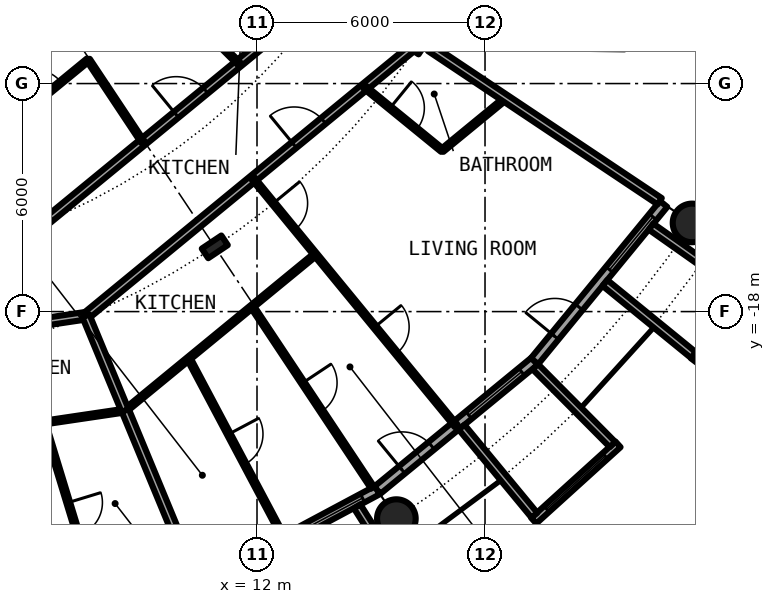
"""IFC4 building model, lengths in metres.
Left out: names, types, materials, properties, quantities, classifications, styles, units other than length and angle.
Written with IfcOpenShell. Run it as: python <this file> out.ifc"""

import sys

from ifc_helpers import new_model, si_unit, direction, frame, frame_2d, origin, origin_2d, place, context, subcontext, project, spatial, rectangle, circle, hollow_circle, i_section, extrude, element, fill, save


model = new_model("IFC4")
c1 = context("Model", 3, precision=1e-05, world=origin(), true_north=direction((0.0, 1.0)))
c2 = subcontext(c1, "Body", "Model", "MODEL_VIEW")
j1 = project(units=[si_unit("LENGTHUNIT", "METRE"), si_unit("PLANEANGLEUNIT", "RADIAN")], contexts=[c1])
p1 = place(None, origin())
s1 = spatial("IfcSite", under=j1, at=p1, CompositionType="ELEMENT")
p2 = place(p1, origin())
s2 = spatial("IfcBuilding", under=s1, at=p2, CompositionType="ELEMENT")
p3 = place(p2, frame((0.0, 0.0, 35.0)))
s3 = spatial("IfcBuildingStorey", under=s2, at=p3, CompositionType="ELEMENT", Elevation=35.0)
for number, where, z_axis, x_axis in (
    (1, (15.667, -23.448, 0.0), (0.0, 0.0, 1.0), (1.0, 0.0, 0.0)),
    (2, (23.448, -15.667, 0.0), (0.0, 0.0, 1.0), (1.0, 0.0, 0.0)),
):
    element("IfcColumn", number, at=place(p3, frame(where, z_axis=z_axis, x_axis=x_axis)), inside=s3, PredefinedType="COLUMN", context=c2, shape_type="SweptSolid", body=[
        extrude(hollow_circle(Radius=0.508, WallThickness=0.05, at=origin_2d()), origin(), (0.0, 0.0, 1.0), 3.05),
    ])
for number, where, z_axis, x_axis in (
    (3, (10.889, -16.297, 0.0), (0.0, 0.0, 1.0), (0.556, -0.831, 0.0)),
    (4, (16.297, -10.889, 0.0), (0.0, 0.0, 1.0), (0.831, -0.556, 0.0)),
):
    element("IfcColumn", number, at=place(p3, frame(where, z_axis=z_axis, x_axis=x_axis)), inside=s3, PredefinedType="COLUMN", context=c2, shape_type="SweptSolid", body=[
        extrude(i_section(OverallWidth=0.305, OverallDepth=0.62, WebThickness=0.021, FlangeThickness=0.04, FilletRadius=0.027, at=origin_2d()), origin(), (0.0, 0.0, 1.0), 3.05),
    ])
p4 = place(p3, frame((10.447, -25.222, 0.0), z_axis=(0.0, 0.0, 1.0), x_axis=(0.881915646801, 0.471407246368, 0.0)))
e5 = element("IfcWall", 5, at=p4, inside=s3, PredefinedType="SOLIDWALL", context=c2, shape_type="SweptSolid", body=[
    extrude(rectangle(XDim=5.352, YDim=0.25, at=frame_2d((2.676, 0.0))), origin(), (0.0, 0.0, 1.0), 2.7),
])
p5 = place(p4, frame((0.841, 0.0, 0.0)))
e6 = element("IfcOpeningElement", 6, at=p5, cuts=e5, PredefinedType="OPENING", context=c2, shape_type="SweptSolid", body=[
    extrude(rectangle(XDim=1.0, YDim=2.2, at=frame_2d((0.5, 1.1))), frame((0.0, 0.135, 0.0), z_axis=(0.0, -1.0, 0.0), x_axis=(1.0, 0.0, 0.0)), (0.0, 0.0, 1.0), 0.27),
])
p6 = place(p4, frame((3.111, 0.0, 0.3)))
e7 = element("IfcOpeningElement", 7, at=p6, cuts=e5, PredefinedType="OPENING", context=c2, shape_type="SweptSolid", body=[
    extrude(rectangle(XDim=1.8, YDim=2.1, at=frame_2d((0.9, 1.05))), frame((0.0, 0.135, 0.0), z_axis=(0.0, -1.0, 0.0), x_axis=(1.0, 0.0, 0.0)), (0.0, 0.0, 1.0), 0.27),
])
p7 = place(p3, frame((14.635, -23.126, -0.03), z_axis=(0.0, 0.0, 1.0), x_axis=(0.534437802731, -0.845207805816, 0.0)))
e8 = element("IfcWall", 8, at=p7, inside=s3, PredefinedType="SOLIDWALL", context=c2, shape_type="SweptSolid", body=[
    extrude(rectangle(XDim=2.932, YDim=0.2, at=frame_2d((1.466, 0.0))), origin(), (0.0, 0.0, 1.0), 2.73),
])
p8 = place(p3, frame((15.167, -22.699, 0.0), z_axis=(0.0, 0.0, 1.0), x_axis=(0.773019449054, 0.634382322723, 0.0)))
e9 = element("IfcWall", 9, at=p8, inside=s3, PredefinedType="SOLIDWALL", context=c2, shape_type="SweptSolid", body=[
    extrude(rectangle(XDim=5.352, YDim=0.25, at=frame_2d((2.676, 0.0))), origin(), (0.0, 0.0, 1.0), 2.7),
])
p9 = place(p8, frame((0.841, 0.0, 0.0)))
e10 = element("IfcOpeningElement", 10, at=p9, cuts=e9, PredefinedType="OPENING", context=c2, shape_type="SweptSolid", body=[
    extrude(rectangle(XDim=1.0, YDim=2.2, at=frame_2d((0.5, 1.1))), frame((0.0, 0.135, 0.0), z_axis=(0.0, -1.0, 0.0), x_axis=(1.0, 0.0, 0.0)), (0.0, 0.0, 1.0), 0.27),
])
p10 = place(p8, frame((3.111, 0.0, 0.3)))
e11 = element("IfcOpeningElement", 11, at=p10, cuts=e9, PredefinedType="OPENING", context=c2, shape_type="SweptSolid", body=[
    extrude(rectangle(XDim=1.8, YDim=2.1, at=frame_2d((0.9, 1.05))), frame((0.0, 0.135, 0.0), z_axis=(0.0, -1.0, 0.0), x_axis=(1.0, 0.0, 0.0)), (0.0, 0.0, 1.0), 0.27),
])
p11 = place(p3, frame((19.282, -23.503, -0.03), z_axis=(0.0, 0.0, 1.0), x_axis=(0.740998365753, 0.671506829416, 0.0)))
e12 = element("IfcWall", 12, at=p11, inside=s3, PredefinedType="SOLIDWALL", context=c2, shape_type="SweptSolid", body=[
    extrude(rectangle(XDim=2.993, YDim=0.2, at=frame_2d((1.497, 0.0))), origin(), (0.0, 0.0, 1.0), 2.73),
])
p12 = place(p11, frame((0.457, 0.0, 0.33)))
e13 = element("IfcOpeningElement", 13, at=p12, cuts=e12, PredefinedType="OPENING", context=c2, shape_type="SweptSolid", body=[
    extrude(circle(Radius=1.04, at=frame_2d((1.04, 1.04))), frame((0.0, 0.11, 0.0), z_axis=(0.0, -1.0, 0.0), x_axis=(1.0, 0.0, 0.0)), (0.0, 0.0, 1.0), 0.22),
])
p13 = place(p3, frame((17.384, -21.041, -0.03), z_axis=(0.0, 0.0, 1.0), x_axis=(0.63709551667, -0.770784861449, 0.0)))
e14 = element("IfcWall", 14, at=p13, inside=s3, PredefinedType="SOLIDWALL", context=c2, shape_type="SweptSolid", body=[
    extrude(rectangle(XDim=3.006, YDim=0.2, at=frame_2d((1.503, 0.0))), origin(), (0.0, 0.0, 1.0), 2.73),
])
p14 = place(p3, frame((19.323, -19.45, -0.03), z_axis=(0.0, 0.0, 1.0), x_axis=(0.704476739375, -0.709727076896, 0.0)))
e15 = element("IfcWall", 15, at=p14, inside=s3, PredefinedType="SOLIDWALL", context=c2, shape_type="SweptSolid", body=[
    extrude(rectangle(XDim=2.883, YDim=0.2, at=frame_2d((1.441, 0.0))), origin(), (0.0, 0.0, 1.0), 2.73),
])
p15 = place(p3, frame((19.304, -19.304, 0.0), z_axis=(0.0, 0.0, 1.0), x_axis=(0.634382322723, 0.773019449054, 0.0)))
e16 = element("IfcWall", 16, at=p15, inside=s3, PredefinedType="SOLIDWALL", context=c2, shape_type="SweptSolid", body=[
    extrude(rectangle(XDim=5.352, YDim=0.25, at=frame_2d((2.676, 0.0))), origin(), (0.0, 0.0, 1.0), 2.7),
])
p16 = place(p15, frame((0.841, 0.0, 0.0)))
e17 = element("IfcOpeningElement", 17, at=p16, cuts=e16, PredefinedType="OPENING", context=c2, shape_type="SweptSolid", body=[
    extrude(rectangle(XDim=1.0, YDim=2.2, at=frame_2d((0.5, 1.1))), frame((0.0, 0.135, 0.0), z_axis=(0.0, -1.0, 0.0), x_axis=(1.0, 0.0, 0.0)), (0.0, 0.0, 1.0), 0.27),
])
p17 = place(p15, frame((3.111, 0.0, 0.3)))
e18 = element("IfcOpeningElement", 18, at=p17, cuts=e16, PredefinedType="OPENING", context=c2, shape_type="SweptSolid", body=[
    extrude(rectangle(XDim=1.8, YDim=2.1, at=frame_2d((0.9, 1.05))), frame((0.0, 0.135, 0.0), z_axis=(0.0, -1.0, 0.0), x_axis=(1.0, 0.0, 0.0)), (0.0, 0.0, 1.0), 0.27),
])
p18 = place(p3, frame((23.497, -19.289, -0.03), z_axis=(0.0, 0.0, 1.0), x_axis=(0.60418752353, 0.796842165306, 0.0)))
e19 = element("IfcWall", 19, at=p18, inside=s3, PredefinedType="SOLIDWALL", context=c2, shape_type="SweptSolid", body=[
    extrude(rectangle(XDim=2.337, YDim=0.2, at=frame_2d((1.168, 0.0))), origin(), (0.0, 0.0, 1.0), 2.73),
])
p19 = place(p18, frame((0.128, 0.0, 0.33)))
e20 = element("IfcOpeningElement", 20, at=p19, cuts=e19, PredefinedType="OPENING", context=c2, shape_type="SweptSolid", body=[
    extrude(circle(Radius=1.04, at=frame_2d((1.04, 1.04))), frame((0.0, 0.11, 0.0), z_axis=(0.0, -1.0, 0.0), x_axis=(1.0, 0.0, 0.0)), (0.0, 0.0, 1.0), 0.22),
])
p20 = place(p3, frame((21.155, -17.246, -0.03), z_axis=(0.0, 0.0, 1.0), x_axis=(0.775179004516, -0.631741648902, 0.0)))
e21 = element("IfcWall", 21, at=p20, inside=s3, PredefinedType="SOLIDWALL", context=c2, shape_type="SweptSolid", body=[
    extrude(rectangle(XDim=3.006, YDim=0.2, at=frame_2d((1.503, 0.0))), origin(), (0.0, 0.0, 1.0), 2.73),
])
p21 = place(p3, frame((22.37, -15.765, -0.03), z_axis=(0.0, 0.0, 1.0), x_axis=(0.817256123454, -0.576274612209, 0.0)))
e22 = element("IfcWall", 22, at=p21, inside=s3, PredefinedType="SOLIDWALL", context=c2, shape_type="SweptSolid", body=[
    extrude(rectangle(XDim=2.933, YDim=0.2, at=frame_2d((1.466, 0.0))), origin(), (0.0, 0.0, 1.0), 2.73),
])
p22 = place(p3, frame((4.246, -21.239, 0.0), z_axis=(0.0, 0.0, 1.0), x_axis=(0.989178348771, 0.146718077695, 0.0)))
e23 = element("IfcWall", 23, at=p22, inside=s3, PredefinedType="PARTITIONING", context=c2, shape_type="SweptSolid", body=[
    extrude(rectangle(XDim=4.335, YDim=0.1, at=frame_2d((2.167, 0.0))), origin(), (0.0, 0.0, 1.0), 2.7),
])
p23 = place(p3, frame((8.534, -20.603, 0.0), z_axis=(0.0, 0.0, 1.0), x_axis=(0.773000340237, 0.634405606843, 0.0)))
e24 = element("IfcWall", 24, at=p23, inside=s3, PredefinedType="PARTITIONING", context=c2, shape_type="SweptSolid", body=[
    extrude(rectangle(XDim=6.474, YDim=0.1, at=frame_2d((3.237, 0.0))), origin(), (0.0, 0.0, 1.0), 2.7),
])
p24 = place(p3, frame((16.874, -13.758, 0.0), z_axis=(0.0, 0.0, 1.0), x_axis=(0.772948171844, 0.634469166818, 0.0)))
e25 = element("IfcWall", 25, at=p24, inside=s3, PredefinedType="PARTITIONING", context=c2, shape_type="SweptSolid", body=[
    extrude(rectangle(XDim=2.158, YDim=0.1, at=frame_2d((1.079, 0.0))), origin(), (0.0, 0.0, 1.0), 2.7),
])
p25 = place(p3, frame((-1.927, -19.506, 0.0), z_axis=(0.0, 0.0, 1.0), x_axis=(0.989181308547, 0.146698121399, 0.0)))
e26 = element("IfcWall", 26, at=p25, inside=s3, PredefinedType="PARTITIONING", context=c2, shape_type="SweptSolid", body=[
    extrude(rectangle(XDim=9.531, YDim=0.2, at=frame_2d((4.766, 0.0))), origin(), (0.0, 0.0, 1.0), 2.38),
])
p26 = place(p25, frame((3.316, 0.0, 0.0)))
e27 = element("IfcOpeningElement", 27, at=p26, cuts=e26, PredefinedType="OPENING", context=c2, shape_type="SweptSolid", body=[
    extrude(rectangle(XDim=1.0, YDim=2.3, at=frame_2d((0.5, 1.15))), frame((0.0, 0.11, 0.0), z_axis=(0.0, -1.0, 0.0), x_axis=(1.0, 0.0, 0.0)), (0.0, 0.0, 1.0), 0.22),
])
p27 = place(p3, frame((7.512, -18.105, 0.0), z_axis=(0.0, 0.0, 1.0), x_axis=(0.772704887747, 0.634765434198, 0.0)))
e28 = element("IfcWall", 28, at=p27, inside=s3, PredefinedType="PARTITIONING", context=c2, shape_type="SweptSolid", body=[
    extrude(rectangle(XDim=11.209, YDim=0.2, at=frame_2d((5.604, 0.0))), origin(), (0.0, 0.0, 1.0), 2.38),
])
p28 = place(p27, frame((7.072, 0.0, 0.0)))
e29 = element("IfcOpeningElement", 29, at=p28, cuts=e28, PredefinedType="OPENING", context=c2, shape_type="SweptSolid", body=[
    extrude(rectangle(XDim=1.0, YDim=2.3, at=frame_2d((0.5, 1.15))), frame((0.0, 0.11, 0.0), z_axis=(0.0, -1.0, 0.0), x_axis=(1.0, 0.0, 0.0)), (0.0, 0.0, 1.0), 0.22),
])
p29 = place(p3, frame((6.467, -15.614, 0.0), z_axis=(0.0, 0.0, 1.0), x_axis=(0.773084654695, 0.634302858794, 0.0)))
e30 = element("IfcWall", 30, at=p29, inside=s3, PredefinedType="PARTITIONING", context=c2, shape_type="SweptSolid", body=[
    extrude(rectangle(XDim=9.793, YDim=0.2, at=frame_2d((4.896, 0.0))), origin(), (0.0, 0.0, 1.0), 2.7),
])
p30 = place(p29, frame((4.407, 0.0, 0.0)))
e31 = element("IfcOpeningElement", 31, at=p30, cuts=e30, PredefinedType="OPENING", context=c2, shape_type="SweptSolid", body=[
    extrude(rectangle(XDim=1.0, YDim=2.3, at=frame_2d((0.5, 1.15))), frame((0.0, 0.11, 0.0), z_axis=(0.0, -1.0, 0.0), x_axis=(1.0, 0.0, 0.0)), (0.0, 0.0, 1.0), 0.22),
])
p31 = place(p3, frame((5.434, -13.119, 0.0), z_axis=(0.0, 0.0, 1.0), x_axis=(0.773049907698, 0.634345205868, 0.0)))
e32 = element("IfcWall", 32, at=p31, inside=s3, PredefinedType="PARTITIONING", context=c2, shape_type="SweptSolid", body=[
    extrude(rectangle(XDim=2.748, YDim=0.1, at=frame_2d((1.374, 0.0))), origin(), (0.0, 0.0, 1.0), 2.7),
])
p32 = place(p31, frame((0.924, 0.0, 0.0)))
e33 = element("IfcOpeningElement", 33, at=p32, cuts=e32, PredefinedType="OPENING", context=c2, shape_type="SweptSolid", body=[
    extrude(rectangle(XDim=0.9, YDim=2.3, at=frame_2d((0.45, 1.15))), frame((0.0, 0.06, 0.0), z_axis=(0.0, -1.0, 0.0), x_axis=(1.0, 0.0, 0.0)), (0.0, 0.0, 1.0), 0.12),
])
p33 = place(p3, frame((6.39, -20.921, 0.0), z_axis=(0.0, 0.0, 1.0), x_axis=(0.292081613207, -0.956393397732, 0.0)))
e34 = element("IfcWall", 34, at=p33, inside=s3, PredefinedType="PARTITIONING", context=c2, shape_type="SweptSolid", body=[
    extrude(rectangle(XDim=5.3, YDim=0.1, at=frame_2d((2.65, 0.0))), origin(), (0.0, 0.0, 1.0), 2.7),
])
p34 = place(p33, frame((2.2, 0.0, 0.0)))
e35 = element("IfcOpeningElement", 35, at=p34, cuts=e34, PredefinedType="OPENING", context=c2, shape_type="SweptSolid", body=[
    extrude(rectangle(XDim=0.9, YDim=2.3, at=frame_2d((0.45, 1.15))), frame((0.0, 0.06, 0.0), z_axis=(0.0, -1.0, 0.0), x_axis=(1.0, 0.0, 0.0)), (0.0, 0.0, 1.0), 0.12),
])
p35 = place(p3, frame((7.496, -18.11, 0.0), z_axis=(0.0, 0.0, 1.0), x_axis=(0.382540781694, -0.923938607452, 0.0)))
e36 = element("IfcWall", 36, at=p35, inside=s3, PredefinedType="PARTITIONING", context=c2, shape_type="SweptSolid", body=[
    extrude(rectangle(XDim=2.7, YDim=0.2, at=frame_2d((1.35, 0.0))), origin(), (0.0, 0.0, 1.0), 2.7),
])
p36 = place(p3, frame((7.558, -11.376, 0.0), z_axis=(0.0, 0.0, 1.0), x_axis=(0.553615197403, -0.83277260594, 0.0)))
e37 = element("IfcWall", 37, at=p36, inside=s3, PredefinedType="PARTITIONING", context=c2, shape_type="SweptSolid", body=[
    extrude(rectangle(XDim=2.597, YDim=0.1, at=frame_2d((1.299, 0.0))), origin(), (0.0, 0.0, 1.0), 2.7),
])
p37 = place(p3, frame((8.534, -20.603, 0.0), z_axis=(0.0, 0.0, 1.0), x_axis=(0.382651153718, -0.923892902104, 0.0)))
e38 = element("IfcWall", 38, at=p37, inside=s3, PredefinedType="PARTITIONING", context=c2, shape_type="SweptSolid", body=[
    extrude(rectangle(XDim=4.874, YDim=0.2, at=frame_2d((2.437, 0.0))), origin(), (0.0, 0.0, 1.0), 2.7),
])
p38 = place(p3, frame((9.679, -9.636, 0.0), z_axis=(0.0, 0.0, 1.0), x_axis=(0.708843617398, -0.705365668341, 0.0)))
e39 = element("IfcWall", 39, at=p38, inside=s3, PredefinedType="PARTITIONING", context=c2, shape_type="SweptSolid", body=[
    extrude(rectangle(XDim=2.597, YDim=0.1, at=frame_2d((1.299, 0.0))), origin(), (0.0, 0.0, 1.0), 2.7),
])
p39 = place(p38, frame((0.849, 0.0, 0.0)))
e40 = element("IfcOpeningElement", 40, at=p39, cuts=e39, PredefinedType="OPENING", context=c2, shape_type="SweptSolid", body=[
    extrude(rectangle(XDim=0.9, YDim=2.3, at=frame_2d((0.45, 1.15))), frame((0.0, 0.06, 0.0), z_axis=(0.0, -1.0, 0.0), x_axis=(1.0, 0.0, 0.0)), (0.0, 0.0, 1.0), 0.12),
])
p40 = place(p3, frame((10.202, -19.234, 0.0), z_axis=(0.0, 0.0, 1.0), x_axis=(0.468610030042, -0.883405139075, 0.0)))
e41 = element("IfcWall", 41, at=p40, inside=s3, PredefinedType="PARTITIONING", context=c2, shape_type="SweptSolid", body=[
    extrude(rectangle(XDim=5.403, YDim=0.1, at=frame_2d((2.702, 0.0))), origin(), (0.0, 0.0, 1.0), 2.7),
])
p41 = place(p40, frame((2.252, 0.0, 0.0)))
e42 = element("IfcOpeningElement", 42, at=p41, cuts=e41, PredefinedType="OPENING", context=c2, shape_type="SweptSolid", body=[
    extrude(rectangle(XDim=0.9, YDim=2.3, at=frame_2d((0.45, 1.15))), frame((0.0, 0.06, 0.0), z_axis=(0.0, -1.0, 0.0), x_axis=(1.0, 0.0, 0.0)), (0.0, 0.0, 1.0), 0.12),
])
p42 = place(p3, frame((11.871, -17.864, 0.0), z_axis=(0.0, 0.0, 1.0), x_axis=(0.553637025191, -0.83275809473, 0.0)))
e43 = element("IfcWall", 43, at=p42, inside=s3, PredefinedType="PARTITIONING", context=c2, shape_type="SweptSolid", body=[
    extrude(rectangle(XDim=5.726, YDim=0.1, at=frame_2d((2.863, 0.0))), origin(), (0.0, 0.0, 1.0), 2.7),
])
p43 = place(p42, frame((2.413, 0.0, 0.0)))
e44 = element("IfcOpeningElement", 44, at=p43, cuts=e43, PredefinedType="OPENING", context=c2, shape_type="SweptSolid", body=[
    extrude(rectangle(XDim=0.9, YDim=2.3, at=frame_2d((0.45, 1.15))), frame((0.0, 0.06, 0.0), z_axis=(0.0, -1.0, 0.0), x_axis=(1.0, 0.0, 0.0)), (0.0, 0.0, 1.0), 0.12),
])
p44 = place(p3, frame((11.899, -14.499, 0.0), z_axis=(0.0, 0.0, 1.0), x_axis=(0.634396151441, -0.77300810024, 0.0)))
e45 = element("IfcWall", 45, at=p44, inside=s3, PredefinedType="PARTITIONING", context=c2, shape_type="SweptSolid", body=[
    extrude(rectangle(XDim=8.419, YDim=0.1, at=frame_2d((4.209, 0.0))), origin(), (0.0, 0.0, 1.0), 2.7),
])
p45 = place(p44, frame((0.84, 0.0, 0.0)))
e46 = element("IfcOpeningElement", 46, at=p45, cuts=e45, PredefinedType="OPENING", context=c2, shape_type="SweptSolid", body=[
    extrude(rectangle(XDim=0.9, YDim=2.3, at=frame_2d((0.45, 1.15))), frame((0.0, 0.06, 0.0), z_axis=(0.0, -1.0, 0.0), x_axis=(1.0, 0.0, 0.0)), (0.0, 0.0, 1.0), 0.12),
])
p46 = place(p44, frame((5.051, 0.0, 0.0)))
e47 = element("IfcOpeningElement", 47, at=p46, cuts=e45, PredefinedType="OPENING", context=c2, shape_type="SweptSolid", body=[
    extrude(rectangle(XDim=0.9, YDim=2.3, at=frame_2d((0.45, 1.15))), frame((0.0, 0.06, 0.0), z_axis=(0.0, -1.0, 0.0), x_axis=(1.0, 0.0, 0.0)), (0.0, 0.0, 1.0), 0.12),
])
p47 = place(p3, frame((14.831, -12.092, 0.0), z_axis=(0.0, 0.0, 1.0), x_axis=(0.774979608522, -0.631986239072, 0.0)))
e48 = element("IfcWall", 48, at=p47, inside=s3, PredefinedType="PARTITIONING", context=c2, shape_type="SweptSolid", body=[
    extrude(rectangle(XDim=2.636, YDim=0.1, at=frame_2d((1.318, 0.0))), origin(), (0.0, 0.0, 1.0), 2.7),
])
p48 = place(p47, frame((0.868, 0.0, 0.0)))
e49 = element("IfcOpeningElement", 49, at=p48, cuts=e48, PredefinedType="OPENING", context=c2, shape_type="SweptSolid", body=[
    extrude(rectangle(XDim=0.9, YDim=2.3, at=frame_2d((0.45, 1.15))), frame((0.0, 0.06, 0.0), z_axis=(0.0, -1.0, 0.0), x_axis=(1.0, 0.0, 0.0)), (0.0, 0.0, 1.0), 0.12),
])
p49 = place(p3, frame((16.554, -11.062, 0.0), z_axis=(0.0, 0.0, 1.0), x_axis=(0.831610607528, -0.555359160765, 0.0)))
e50 = element("IfcWall", 50, at=p49, inside=s3, PredefinedType="PARTITIONING", context=c2, shape_type="SweptSolid", body=[
    extrude(rectangle(XDim=7.265, YDim=0.2, at=frame_2d((3.633, 0.0))), origin(), (0.0, 0.0, 1.0), 2.7),
])
p50 = place(p6, origin())
e51 = element("IfcWindow", 51, at=p50, inside=s3, PartitioningType="SINGLE_PANEL", PredefinedType="WINDOW", context=c2, shape_type="SweptSolid", body=[
    extrude(rectangle(XDim=1.8, YDim=2.1, at=frame_2d((0.9, 1.05))), frame((0.0, 0.03, 0.0), z_axis=(0.0, -1.0, 0.0), x_axis=(1.0, 0.0, 0.0)), (0.0, 0.0, 1.0), 0.06),
])
fill(e7, e51)
p51 = place(p9, origin())
e52 = element("IfcDoor", 52, at=p51, inside=s3, OperationType="SINGLE_SWING_LEFT", PredefinedType="DOOR", context=c2, shape_type="SweptSolid", body=[
    extrude(rectangle(XDim=1.0, YDim=2.2, at=frame_2d((0.5, 1.1))), frame((0.0, 0.025, 0.0), z_axis=(0.0, -1.0, 0.0), x_axis=(1.0, 0.0, 0.0)), (0.0, 0.0, 1.0), 0.05),
])
fill(e10, e52)
p52 = place(p10, origin())
e53 = element("IfcWindow", 53, at=p52, inside=s3, PartitioningType="SINGLE_PANEL", PredefinedType="WINDOW", context=c2, shape_type="SweptSolid", body=[
    extrude(rectangle(XDim=1.8, YDim=2.1, at=frame_2d((0.9, 1.05))), frame((0.0, 0.03, 0.0), z_axis=(0.0, -1.0, 0.0), x_axis=(1.0, 0.0, 0.0)), (0.0, 0.0, 1.0), 0.06),
])
fill(e11, e53)
p53 = place(p12, origin())
e54 = element("IfcWindow", 54, at=p53, inside=s3, PartitioningType="SINGLE_PANEL", PredefinedType="WINDOW", context=c2, shape_type="SweptSolid", body=[
    extrude(circle(Radius=1.04, at=frame_2d((1.04, 1.04))), frame((0.0, 0.03, 0.0), z_axis=(0.0, -1.0, 0.0), x_axis=(1.0, 0.0, 0.0)), (0.0, 0.0, 1.0), 0.06),
])
fill(e13, e54)
p54 = place(p16, origin())
e55 = element("IfcDoor", 55, at=p54, inside=s3, OperationType="SINGLE_SWING_LEFT", PredefinedType="DOOR", context=c2, shape_type="SweptSolid", body=[
    extrude(rectangle(XDim=1.0, YDim=2.2, at=frame_2d((0.5, 1.1))), frame((0.0, 0.025, 0.0), z_axis=(0.0, -1.0, 0.0), x_axis=(1.0, 0.0, 0.0)), (0.0, 0.0, 1.0), 0.05),
])
fill(e17, e55)
p55 = place(p17, origin())
e56 = element("IfcWindow", 56, at=p55, inside=s3, PartitioningType="SINGLE_PANEL", PredefinedType="WINDOW", context=c2, shape_type="SweptSolid", body=[
    extrude(rectangle(XDim=1.8, YDim=2.1, at=frame_2d((0.9, 1.05))), frame((0.0, 0.03, 0.0), z_axis=(0.0, -1.0, 0.0), x_axis=(1.0, 0.0, 0.0)), (0.0, 0.0, 1.0), 0.06),
])
fill(e18, e56)
p56 = place(p34, origin())
e57 = element("IfcDoor", 57, at=p56, inside=s3, OperationType="SINGLE_SWING_LEFT", PredefinedType="DOOR", context=c2, shape_type="SweptSolid", body=[
    extrude(rectangle(XDim=0.9, YDim=2.3, at=frame_2d((0.45, 1.15))), frame((0.0, 0.025, 0.0), z_axis=(0.0, -1.0, 0.0), x_axis=(1.0, 0.0, 0.0)), (0.0, 0.0, 1.0), 0.05),
])
fill(e35, e57)
p57 = place(p28, origin())
e58 = element("IfcDoor", 58, at=p57, inside=s3, OperationType="SINGLE_SWING_RIGHT", PredefinedType="DOOR", context=c2, shape_type="SweptSolid", body=[
    extrude(rectangle(XDim=1.0, YDim=2.3, at=frame_2d((0.5, 1.15))), frame((0.0, 0.025, 0.0), z_axis=(0.0, -1.0, 0.0), x_axis=(1.0, 0.0, 0.0)), (0.0, 0.0, 1.0), 0.05),
])
fill(e29, e58)
p58 = place(p48, origin())
e59 = element("IfcDoor", 59, at=p58, inside=s3, OperationType="SINGLE_SWING_RIGHT", PredefinedType="DOOR", context=c2, shape_type="SweptSolid", body=[
    extrude(rectangle(XDim=0.9, YDim=2.3, at=frame_2d((0.45, 1.15))), frame((0.0, 0.025, 0.0), z_axis=(0.0, -1.0, 0.0), x_axis=(1.0, 0.0, 0.0)), (0.0, 0.0, 1.0), 0.05),
])
fill(e49, e59)
p59 = place(p45, origin())
e60 = element("IfcDoor", 60, at=p59, inside=s3, OperationType="SINGLE_SWING_LEFT", PredefinedType="DOOR", context=c2, shape_type="SweptSolid", body=[
    extrude(rectangle(XDim=0.9, YDim=2.3, at=frame_2d((0.45, 1.15))), frame((0.0, 0.025, 0.0), z_axis=(0.0, -1.0, 0.0), x_axis=(1.0, 0.0, 0.0)), (0.0, 0.0, 1.0), 0.05),
])
fill(e46, e60)
p60 = place(p46, origin())
e61 = element("IfcDoor", 61, at=p60, inside=s3, OperationType="SINGLE_SWING_RIGHT", PredefinedType="DOOR", context=c2, shape_type="SweptSolid", body=[
    extrude(rectangle(XDim=0.9, YDim=2.3, at=frame_2d((0.45, 1.15))), frame((0.0, 0.025, 0.0), z_axis=(0.0, -1.0, 0.0), x_axis=(1.0, 0.0, 0.0)), (0.0, 0.0, 1.0), 0.05),
])
fill(e47, e61)
p61 = place(p43, origin())
e62 = element("IfcDoor", 62, at=p61, inside=s3, OperationType="SINGLE_SWING_RIGHT", PredefinedType="DOOR", context=c2, shape_type="SweptSolid", body=[
    extrude(rectangle(XDim=0.9, YDim=2.3, at=frame_2d((0.45, 1.15))), frame((0.0, 0.025, 0.0), z_axis=(0.0, -1.0, 0.0), x_axis=(1.0, 0.0, 0.0)), (0.0, 0.0, 1.0), 0.05),
])
fill(e44, e62)
p62 = place(p41, origin())
e63 = element("IfcDoor", 63, at=p62, inside=s3, OperationType="SINGLE_SWING_RIGHT", PredefinedType="DOOR", context=c2, shape_type="SweptSolid", body=[
    extrude(rectangle(XDim=0.9, YDim=2.3, at=frame_2d((0.45, 1.15))), frame((0.0, 0.025, 0.0), z_axis=(0.0, -1.0, 0.0), x_axis=(1.0, 0.0, 0.0)), (0.0, 0.0, 1.0), 0.05),
])
fill(e42, e63)
p63 = place(p30, origin())
e64 = element("IfcDoor", 64, at=p63, inside=s3, OperationType="SINGLE_SWING_RIGHT", PredefinedType="DOOR", context=c2, shape_type="SweptSolid", body=[
    extrude(rectangle(XDim=1.0, YDim=2.3, at=frame_2d((0.5, 1.15))), frame((0.0, 0.025, 0.0), z_axis=(0.0, -1.0, 0.0), x_axis=(1.0, 0.0, 0.0)), (0.0, 0.0, 1.0), 0.05),
])
fill(e31, e64)
p64 = place(p32, origin())
e65 = element("IfcDoor", 65, at=p64, inside=s3, OperationType="SINGLE_SWING_RIGHT", PredefinedType="DOOR", context=c2, shape_type="SweptSolid", body=[
    extrude(rectangle(XDim=0.9, YDim=2.3, at=frame_2d((0.45, 1.15))), frame((0.0, 0.025, 0.0), z_axis=(0.0, -1.0, 0.0), x_axis=(1.0, 0.0, 0.0)), (0.0, 0.0, 1.0), 0.05),
])
fill(e33, e65)
save(model, sys.argv[1])
